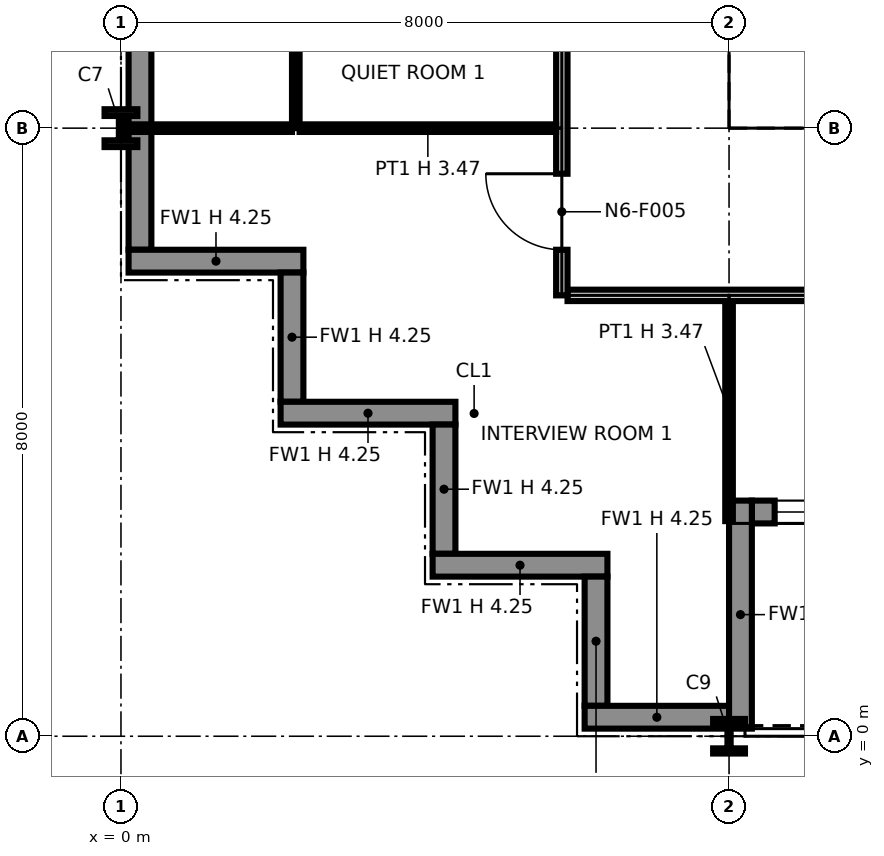
"""IFC4 building model, lengths in metres.
Left out: names, types, materials, properties, quantities, classifications, styles, units other than length and angle.
Written with IfcOpenShell. Run it as: python <this file> out.ifc"""

import sys

from ifc_helpers import new_model, si_unit, direction, frame, frame_2d, origin, origin_2d, place, context, subcontext, project, spatial, polyline, rectangle, i_section, outline, extrude, element, fill, save


model = new_model("IFC4")
c1 = context("Model", 3, precision=1e-05, world=origin(), true_north=direction((0.0, 1.0)))
c2 = subcontext(c1, "Body", "Model", "MODEL_VIEW")
j1 = project(units=[si_unit("LENGTHUNIT", "METRE"), si_unit("PLANEANGLEUNIT", "RADIAN")], contexts=[c1])
p1 = place(None, origin())
s1 = spatial("IfcSite", under=j1, at=p1, CompositionType="ELEMENT")
p2 = place(p1, origin())
s2 = spatial("IfcBuilding", under=s1, at=p2, CompositionType="ELEMENT")
p3 = place(p2, frame((0.0, 0.0, 96.4)))
s3 = spatial("IfcBuildingStorey", under=s2, at=p3, CompositionType="ELEMENT", Elevation=96.4)
p4 = place(p3, frame((0.0, 8.0, 0.0), z_axis=(0.0, 0.0, 1.0), x_axis=(1.0, 0.0, 0.0)))
e1 = element("IfcColumn", 1, at=p4, inside=s3, PredefinedType="COLUMN", context=c2, shape_type="SweptSolid", body=[
    extrude(i_section(OverallWidth=0.432, OverallDepth=0.498, WebThickness=0.056, FlangeThickness=0.089, at=origin_2d()), origin(), (0.0, 0.0, 1.0), 4.25),
])
p5 = place(p3, frame((8.0, 0.0, 0.0), z_axis=(0.0, 0.0, 1.0), x_axis=(1.0, 0.0, 0.0)))
e2 = element("IfcColumn", 2, at=p5, inside=s3, PredefinedType="COLUMN", context=c2, shape_type="SweptSolid", body=[
    extrude(i_section(OverallWidth=0.419, OverallDepth=0.455, WebThickness=0.042, FlangeThickness=0.068, at=origin_2d()), origin(), (0.0, 0.0, 1.0), 4.25),
])
p6 = place(p3, frame((8.0, 8.0, 0.0), z_axis=(0.0, 0.0, 1.0), x_axis=(1.0, 0.0, 0.0)))
e3 = element("IfcColumn", 3, at=p6, inside=s3, PredefinedType="COLUMN", context=c2, shape_type="SweptSolid", body=[
    extrude(i_section(OverallWidth=0.406, OverallDepth=0.417, WebThickness=0.03, FlangeThickness=0.048, at=origin_2d()), origin(), (0.0, 0.0, 1.0), 4.25),
])
p7 = place(p3, frame((0.25, 16.0, 0.0), z_axis=(0.0, 0.0, 1.0), x_axis=(0.0, -1.0, 0.0)))
e4 = element("IfcWall", 4, at=p7, inside=s3, PredefinedType="SOLIDWALL", context=c2, shape_type="SweptSolid", body=[
    extrude(rectangle(XDim=9.6, YDim=0.3, at=frame_2d((4.8, 0.0))), origin(), (0.0, 0.0, 1.0), 4.25),
])
p8 = place(p3, frame((0.1, 6.25, 0.0), z_axis=(0.0, 0.0, 1.0), x_axis=(1.0, 0.0, 0.0)))
e5 = element("IfcWall", 5, at=p8, inside=s3, PredefinedType="SOLIDWALL", context=c2, shape_type="SweptSolid", body=[
    extrude(rectangle(XDim=2.3, YDim=0.3, at=frame_2d((1.15, 0.0))), origin(), (0.0, 0.0, 1.0), 4.25),
])
p9 = place(p3, frame((2.25, 6.1, 0.0), z_axis=(0.0, 0.0, 1.0), x_axis=(0.0, -1.0, 0.0)))
e6 = element("IfcWall", 6, at=p9, inside=s3, PredefinedType="SOLIDWALL", context=c2, shape_type="SweptSolid", body=[
    extrude(rectangle(XDim=1.7, YDim=0.3, at=frame_2d((0.85, 0.0))), origin(), (0.0, 0.0, 1.0), 4.25),
])
p10 = place(p3, frame((2.1, 4.25, 0.0), z_axis=(0.0, 0.0, 1.0), x_axis=(1.0, 0.0, 0.0)))
e7 = element("IfcWall", 7, at=p10, inside=s3, PredefinedType="SOLIDWALL", context=c2, shape_type="SweptSolid", body=[
    extrude(rectangle(XDim=2.3, YDim=0.3, at=frame_2d((1.15, 0.0))), origin(), (0.0, 0.0, 1.0), 4.25),
])
p11 = place(p3, frame((4.25, 4.1, 0.0), z_axis=(0.0, 0.0, 1.0), x_axis=(0.0, -1.0, 0.0)))
e8 = element("IfcWall", 8, at=p11, inside=s3, PredefinedType="SOLIDWALL", context=c2, shape_type="SweptSolid", body=[
    extrude(rectangle(XDim=1.7, YDim=0.3, at=frame_2d((0.85, 0.0))), origin(), (0.0, 0.0, 1.0), 4.25),
])
p12 = place(p3, frame((4.1, 2.25, 0.0), z_axis=(0.0, 0.0, 1.0), x_axis=(1.0, 0.0, 0.0)))
e9 = element("IfcWall", 9, at=p12, inside=s3, PredefinedType="SOLIDWALL", context=c2, shape_type="SweptSolid", body=[
    extrude(rectangle(XDim=2.3, YDim=0.3, at=frame_2d((1.15, 0.0))), origin(), (0.0, 0.0, 1.0), 4.25),
])
p13 = place(p3, frame((6.25, 2.1, 0.0), z_axis=(0.0, 0.0, 1.0), x_axis=(0.0, -1.0, 0.0)))
e10 = element("IfcWall", 10, at=p13, inside=s3, PredefinedType="SOLIDWALL", context=c2, shape_type="SweptSolid", body=[
    extrude(rectangle(XDim=1.7, YDim=0.3, at=frame_2d((0.85, 0.0))), origin(), (0.0, 0.0, 1.0), 4.25),
])
p14 = place(p3, frame((6.1, 0.25, 0.0), z_axis=(0.0, 0.0, 1.0), x_axis=(1.0, 0.0, 0.0)))
e11 = element("IfcWall", 11, at=p14, inside=s3, PredefinedType="SOLIDWALL", context=c2, shape_type="SweptSolid", body=[
    extrude(rectangle(XDim=1.9, YDim=0.3, at=frame_2d((0.95, 0.0))), origin(), (0.0, 0.0, 1.0), 4.25),
])
p15 = place(p3, frame((8.3, 2.95, 0.0), z_axis=(0.0, 0.0, 1.0), x_axis=(1.0, 0.0, 0.0)))
e12 = element("IfcWall", 12, at=p15, inside=s3, PredefinedType="SOLIDWALL", context=c2, shape_type="SweptSolid", body=[
    extrude(rectangle(XDim=7.4, YDim=0.3, at=frame_2d((3.7, 0.0))), origin(), (0.0, 0.0, 1.0), 4.25),
])
p16 = place(p15, frame((0.3, 0.0, 0.9)))
e13 = element("IfcOpeningElement", 13, at=p16, cuts=e12, PredefinedType="OPENING", context=c2, shape_type="SweptSolid", body=[
    extrude(rectangle(XDim=2.8, YDim=2.2, at=frame_2d((1.4, 1.1))), frame((0.0, 0.16, 0.0), z_axis=(0.0, -1.0, 0.0), x_axis=(1.0, 0.0, 0.0)), (0.0, 0.0, 1.0), 0.32),
])
p17 = place(p15, frame((4.7, 0.0, 0.0)))
e14 = element("IfcOpeningElement", 14, at=p17, cuts=e12, PredefinedType="OPENING", context=c2, shape_type="SweptSolid", body=[
    extrude(rectangle(XDim=2.0, YDim=2.4, at=frame_2d((1.0, 1.2))), frame((0.0, 0.16, 0.0), z_axis=(0.0, -1.0, 0.0), x_axis=(1.0, 0.0, 0.0)), (0.0, 0.0, 1.0), 0.32),
])
p18 = place(p3, frame((8.15, 0.1, 0.0), z_axis=(0.0, 0.0, 1.0), x_axis=(0.0, 1.0, 0.0)))
e15 = element("IfcWall", 15, at=p18, inside=s3, PredefinedType="SOLIDWALL", context=c2, shape_type="SweptSolid", body=[
    extrude(rectangle(XDim=3.0, YDim=0.3, at=frame_2d((1.5, 0.0))), origin(), (0.0, 0.0, 1.0), 3.469),
])
p19 = place(p3, frame((8.65, 8.75, 0.0), z_axis=(0.0, 0.0, 1.0), x_axis=(1.0, 0.0, 0.0)))
e16 = element("IfcWall", 16, at=p19, inside=s3, PredefinedType="PARTITIONING", context=c2, shape_type="SweptSolid", body=[
    extrude(outline(polyline([(0.0, 0.0), (14.7, 0.0), (14.7, 4.25), (7.469, 4.25), (7.469, 3.632), (7.231, 3.632), (7.23, 4.25), (0.0, 4.25), (0.0, 0.0)])), frame((0.0, 0.1, 0.0), z_axis=(0.0, -1.0, 0.0), x_axis=(1.0, 0.0, 0.0)), (0.0, 0.0, 1.0), 0.2),
])
p20 = place(p19, frame((1.3, 0.0, 0.0)))
e17 = element("IfcOpeningElement", 17, at=p20, cuts=e16, PredefinedType="OPENING", context=c2, shape_type="SweptSolid", body=[
    extrude(rectangle(XDim=1.4, YDim=2.1, at=frame_2d((0.7, 1.05))), frame((0.0, 0.11, 0.0), z_axis=(0.0, -1.0, 0.0), x_axis=(1.0, 0.0, 0.0)), (0.0, 0.0, 1.0), 0.22),
])
p21 = place(p19, frame((4.6, 0.0, 0.0)))
e18 = element("IfcOpeningElement", 18, at=p21, cuts=e16, PredefinedType="OPENING", context=c2, shape_type="SweptSolid", body=[
    extrude(rectangle(XDim=1.4, YDim=2.1, at=frame_2d((0.7, 1.05))), frame((0.0, 0.11, 0.0), z_axis=(0.0, -1.0, 0.0), x_axis=(1.0, 0.0, 0.0)), (0.0, 0.0, 1.0), 0.22),
])
p22 = place(p19, frame((10.4, 0.0, 0.0)))
e19 = element("IfcOpeningElement", 19, at=p22, cuts=e16, PredefinedType="OPENING", context=c2, shape_type="SweptSolid", body=[
    extrude(rectangle(XDim=1.2, YDim=2.1, at=frame_2d((0.6, 1.05))), frame((0.0, 0.11, 0.0), z_axis=(0.0, -1.0, 0.0), x_axis=(1.0, 0.0, 0.0)), (0.0, 0.0, 1.0), 0.22),
])
p23 = place(p3, frame((8.75, 8.85, 0.0), z_axis=(0.0, 0.0, 1.0), x_axis=(0.0, 1.0, 0.0)))
e20 = element("IfcWall", 20, at=p23, inside=s3, PredefinedType="PARTITIONING", context=c2, shape_type="SweptSolid", body=[
    extrude(outline(polyline([(0.0, 0.0), (14.3, 0.0), (14.3, 4.25), (10.231, 4.25), (10.23, 3.789), (10.07, 3.789), (10.069, 4.25), (7.27, 4.25), (7.269, 3.632), (7.031, 3.632), (7.031, 4.25), (0.0, 4.25), (0.0, 0.0)])), frame((0.0, 0.1, 0.0), z_axis=(0.0, -1.0, 0.0), x_axis=(1.0, 0.0, 0.0)), (0.0, 0.0, 1.0), 0.2),
])
p24 = place(p23, frame((8.3, 0.0, 0.0)))
e21 = element("IfcOpeningElement", 21, at=p24, cuts=e20, PredefinedType="OPENING", context=c2, shape_type="SweptSolid", body=[
    extrude(rectangle(XDim=1.8, YDim=2.1, at=frame_2d((0.9, 1.05))), frame((0.0, 0.11, 0.0), z_axis=(0.0, -1.0, 0.0), x_axis=(1.0, 0.0, 0.0)), (0.0, 0.0, 1.0), 0.22),
])
p25 = place(p3, frame((8.0, 2.83, 0.0), z_axis=(0.0, 0.0, 1.0), x_axis=(0.0, 1.0, 0.0)))
e22 = element("IfcWall", 22, at=p25, inside=s3, PredefinedType="PARTITIONING", context=c2, shape_type="SweptSolid", body=[
    extrude(rectangle(XDim=2.895, YDim=0.1, at=frame_2d((1.448, 0.0))), origin(), (0.0, 0.0, 1.0), 3.47),
])
p26 = place(p3, frame((5.875, 5.8, 0.0), z_axis=(0.0, 0.0, 1.0), x_axis=(1.0, 0.0, 0.0)))
e23 = element("IfcWall", 23, at=p26, inside=s3, PredefinedType="PARTITIONING", context=c2, shape_type="SweptSolid", body=[
    extrude(rectangle(XDim=20.25, YDim=0.15, at=frame_2d((10.125, 0.0))), origin(), (0.0, 0.0, 1.0), 4.25),
])
p27 = place(p26, frame((14.625, 0.0, 0.0), z_axis=(0.0, 0.0, 1.0), x_axis=(-1.0, 0.0, 0.0)))
e24 = element("IfcOpeningElement", 24, at=p27, cuts=e23, PredefinedType="OPENING", context=c2, shape_type="SweptSolid", body=[
    extrude(rectangle(XDim=1.0, YDim=2.1, at=frame_2d((0.5, 1.05))), frame((0.0, 0.085, 0.0), z_axis=(0.0, -1.0, 0.0), x_axis=(1.0, 0.0, 0.0)), (0.0, 0.0, 1.0), 0.17),
])
p28 = place(p26, frame((4.625, 0.0, 0.0), z_axis=(0.0, 0.0, 1.0), x_axis=(-1.0, 0.0, 0.0)))
e25 = element("IfcOpeningElement", 25, at=p28, cuts=e23, PredefinedType="OPENING", context=c2, shape_type="SweptSolid", body=[
    extrude(rectangle(XDim=1.0, YDim=2.1, at=frame_2d((0.5, 1.05))), frame((0.0, 0.085, 0.0), z_axis=(0.0, -1.0, 0.0), x_axis=(1.0, 0.0, 0.0)), (0.0, 0.0, 1.0), 0.17),
])
p29 = place(p26, frame((8.625, 0.0, 0.0), z_axis=(0.0, 0.0, 1.0), x_axis=(-1.0, 0.0, 0.0)))
e26 = element("IfcOpeningElement", 26, at=p29, cuts=e23, PredefinedType="OPENING", context=c2, shape_type="SweptSolid", body=[
    extrude(rectangle(XDim=1.0, YDim=2.1, at=frame_2d((0.5, 1.05))), frame((0.0, 0.085, 0.0), z_axis=(0.0, -1.0, 0.0), x_axis=(1.0, 0.0, 0.0)), (0.0, 0.0, 1.0), 0.17),
])
p30 = place(p3, frame((5.8, 5.8, 0.0), z_axis=(0.0, 0.0, 1.0), x_axis=(0.0, 1.0, 0.0)))
e27 = element("IfcWall", 27, at=p30, inside=s3, PredefinedType="PARTITIONING", context=c2, shape_type="SweptSolid", body=[
    extrude(outline(polyline([(0.0, 0.0), (20.325, 0.0), (20.325, 4.25), (18.5, 4.25), (18.498, 3.47), (17.902, 3.47), (17.9, 4.25), (14.5, 4.25), (14.498, 3.47), (13.902, 3.47), (13.9, 4.25), (10.5, 4.25), (10.498, 3.47), (9.902, 3.47), (9.9, 4.25), (6.5, 4.25), (6.498, 3.47), (5.902, 3.47), (5.9, 4.25), (2.5, 4.25), (2.498, 3.47), (1.902, 3.47), (1.9, 4.25), (0.0, 4.25), (0.0, 0.0)])), frame((0.0, 0.075, 0.0), z_axis=(0.0, -1.0, 0.0), x_axis=(1.0, 0.0, 0.0)), (0.0, 0.0, 1.0), 0.15),
])
p31 = place(p30, frame((0.6, 0.0, 0.0)))
e28 = element("IfcOpeningElement", 28, at=p31, cuts=e27, PredefinedType="OPENING", context=c2, shape_type="SweptSolid", body=[
    extrude(rectangle(XDim=1.0, YDim=2.1, at=frame_2d((0.5, 1.05))), frame((0.0, 0.085, 0.0), z_axis=(0.0, -1.0, 0.0), x_axis=(1.0, 0.0, 0.0)), (0.0, 0.0, 1.0), 0.17),
])
p32 = place(p30, frame((3.7, 0.0, 0.0)))
e29 = element("IfcOpeningElement", 29, at=p32, cuts=e27, PredefinedType="OPENING", context=c2, shape_type="SweptSolid", body=[
    extrude(rectangle(XDim=1.0, YDim=2.1, at=frame_2d((0.5, 1.05))), frame((0.0, 0.085, 0.0), z_axis=(0.0, -1.0, 0.0), x_axis=(1.0, 0.0, 0.0)), (0.0, 0.0, 1.0), 0.17),
])
p33 = place(p30, frame((7.7, 0.0, 0.0)))
e30 = element("IfcOpeningElement", 30, at=p33, cuts=e27, PredefinedType="OPENING", context=c2, shape_type="SweptSolid", body=[
    extrude(rectangle(XDim=1.0, YDim=2.1, at=frame_2d((0.5, 1.05))), frame((0.0, 0.085, 0.0), z_axis=(0.0, -1.0, 0.0), x_axis=(1.0, 0.0, 0.0)), (0.0, 0.0, 1.0), 0.17),
])
p34 = place(p30, frame((11.425, 0.0, 0.0)))
e31 = element("IfcOpeningElement", 31, at=p34, cuts=e27, PredefinedType="OPENING", context=c2, shape_type="SweptSolid", body=[
    extrude(rectangle(XDim=1.0, YDim=2.1, at=frame_2d((0.5, 1.05))), frame((0.0, 0.085, 0.0), z_axis=(0.0, -1.0, 0.0), x_axis=(1.0, 0.0, 0.0)), (0.0, 0.0, 1.0), 0.17),
])
p35 = place(p30, frame((15.7, 0.0, 0.0)))
e32 = element("IfcOpeningElement", 32, at=p35, cuts=e27, PredefinedType="OPENING", context=c2, shape_type="SweptSolid", body=[
    extrude(rectangle(XDim=1.0, YDim=2.1, at=frame_2d((0.5, 1.05))), frame((0.0, 0.085, 0.0), z_axis=(0.0, -1.0, 0.0), x_axis=(1.0, 0.0, 0.0)), (0.0, 0.0, 1.0), 0.17),
])
p36 = place(p3, frame((0.13, 8.0, 0.0), z_axis=(0.0, 0.0, 1.0), x_axis=(1.0, 0.0, 0.0)))
e33 = element("IfcWall", 33, at=p36, inside=s3, PredefinedType="PARTITIONING", context=c2, shape_type="SweptSolid", body=[
    extrude(rectangle(XDim=2.12, YDim=0.1, at=frame_2d((1.06, 0.0))), origin(), (0.0, 0.0, 1.0), 3.47),
])
p37 = place(p3, frame((2.35, 8.0, 0.0), z_axis=(0.0, 0.0, 1.0), x_axis=(1.0, 0.0, 0.0)))
e34 = element("IfcWall", 34, at=p37, inside=s3, PredefinedType="PARTITIONING", context=c2, shape_type="SweptSolid", body=[
    extrude(rectangle(XDim=3.375, YDim=0.1, at=frame_2d((1.688, 0.0))), origin(), (0.0, 0.0, 1.0), 3.47),
])
p38 = place(p3, frame((2.3, 8.0, 0.0), z_axis=(0.0, 0.0, 1.0), x_axis=(0.0, 1.0, 0.0)))
e35 = element("IfcWall", 35, at=p38, inside=s3, PredefinedType="PARTITIONING", context=c2, shape_type="SweptSolid", body=[
    extrude(rectangle(XDim=3.95, YDim=0.1, at=frame_2d((1.975, 0.0))), origin(), (0.0, 0.0, 1.0), 4.25),
])
p39 = place(p38, frame((2.5, 0.0, 0.0), z_axis=(0.0, 0.0, 1.0), x_axis=(-1.0, 0.0, 0.0)))
e36 = element("IfcOpeningElement", 36, at=p39, cuts=e35, PredefinedType="OPENING", context=c2, shape_type="SweptSolid", body=[
    extrude(rectangle(XDim=1.0, YDim=2.1, at=frame_2d((0.5, 1.05))), frame((0.0, 0.06, 0.0), z_axis=(0.0, -1.0, 0.0), x_axis=(1.0, 0.0, 0.0)), (0.0, 0.0, 1.0), 0.12),
])
p40 = place(p16, origin())
e37 = element("IfcWindow", 37, at=p40, inside=s3, PartitioningType="SINGLE_PANEL", PredefinedType="WINDOW", context=c2, shape_type="SweptSolid", body=[
    extrude(rectangle(XDim=2.8, YDim=2.2, at=frame_2d((1.4, 1.1))), frame((0.0, 0.03, 0.0), z_axis=(0.0, -1.0, 0.0), x_axis=(1.0, 0.0, 0.0)), (0.0, 0.0, 1.0), 0.06),
])
fill(e13, e37)
p41 = place(p31, origin())
e38 = element("IfcDoor", 38, at=p41, inside=s3, OperationType="SINGLE_SWING_RIGHT", PredefinedType="DOOR", context=c2, shape_type="SweptSolid", body=[
    extrude(rectangle(XDim=1.0, YDim=2.1, at=frame_2d((0.5, 1.05))), frame((0.0, 0.025, 0.0), z_axis=(0.0, -1.0, 0.0), x_axis=(1.0, 0.0, 0.0)), (0.0, 0.0, 1.0), 0.05),
])
fill(e28, e38)
save(model, sys.argv[1])
